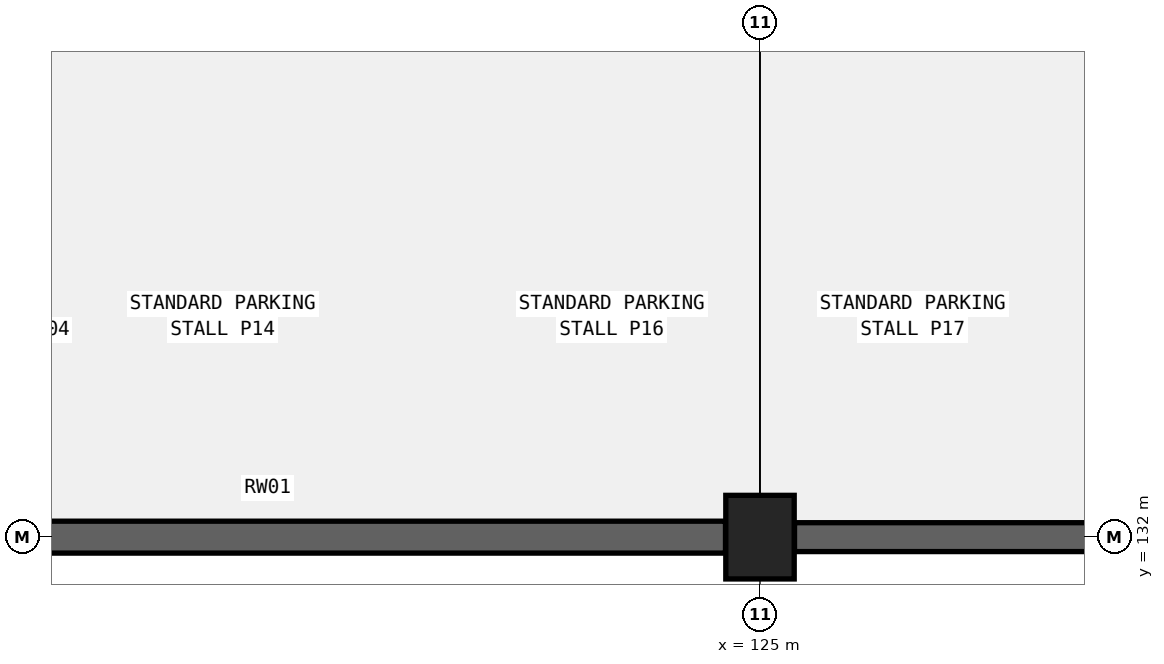
"""IFC4 building model, lengths in metres.
Left out: names, types, materials, properties, quantities, classifications, styles, units other than length and angle.
Written with IfcOpenShell. Run it as: python <this file> out.ifc"""

import sys

from ifc_helpers import new_model, si_unit, direction, frame, frame_2d, origin, origin_2d, place, context, subcontext, project, spatial, rectangle, extrude, element, save


model = new_model("IFC4")
c1 = context("Model", 3, precision=1e-05, world=origin(), true_north=direction((0.0, 1.0)))
c2 = subcontext(c1, "Body", "Model", "MODEL_VIEW")
j1 = project(units=[si_unit("LENGTHUNIT", "METRE"), si_unit("PLANEANGLEUNIT", "RADIAN")], contexts=[c1])
p1 = place(None, origin())
s1 = spatial("IfcSite", under=j1, at=p1, CompositionType="ELEMENT")
p2 = place(p1, origin())
s2 = spatial("IfcBuilding", under=s1, at=p2, CompositionType="ELEMENT")
p3 = place(p2, frame((0.0, 0.0, -4.8)))
s3 = spatial("IfcBuildingStorey", under=s2, at=p3, CompositionType="ELEMENT", Elevation=-4.8)
p4 = place(p3, frame((125.0, 132.0, 0.0), z_axis=(0.0, 0.0, 1.0), x_axis=(1.0, 0.0, 0.0)))
e1 = element("IfcColumn", 1, at=p4, inside=s3, PredefinedType="COLUMN", context=c2, shape_type="SweptSolid", body=[
    extrude(rectangle(XDim=0.9, YDim=1.1, at=origin_2d()), origin(), (0.0, 0.0, 1.0), 4.8),
])
p5 = place(p3, frame((112.504, 132.0, 0.0), z_axis=(0.0, 0.0, 1.0), x_axis=(1.0, 0.0, 0.0)))
e2 = element("IfcWall", 2, at=p5, inside=s3, PredefinedType="STANDARD", context=c2, shape_type="SweptSolid", body=[
    extrude(rectangle(XDim=12.042, YDim=0.42, at=frame_2d((6.021, 0.0))), origin(), (0.0, 0.0, 1.0), 4.46),
])
p6 = place(p3, frame((125.454, 132.0, 0.0), z_axis=(0.0, 0.0, 1.0), x_axis=(1.0, 0.0, 0.0)))
e3 = element("IfcWall", 3, at=p6, inside=s3, PredefinedType="STANDARD", context=c2, shape_type="SweptSolid", body=[
    extrude(rectangle(XDim=11.642, YDim=0.38, at=frame_2d((5.821, 0.0))), origin(), (0.0, 0.0, 1.0), 4.46),
])
save(model, sys.argv[1])
